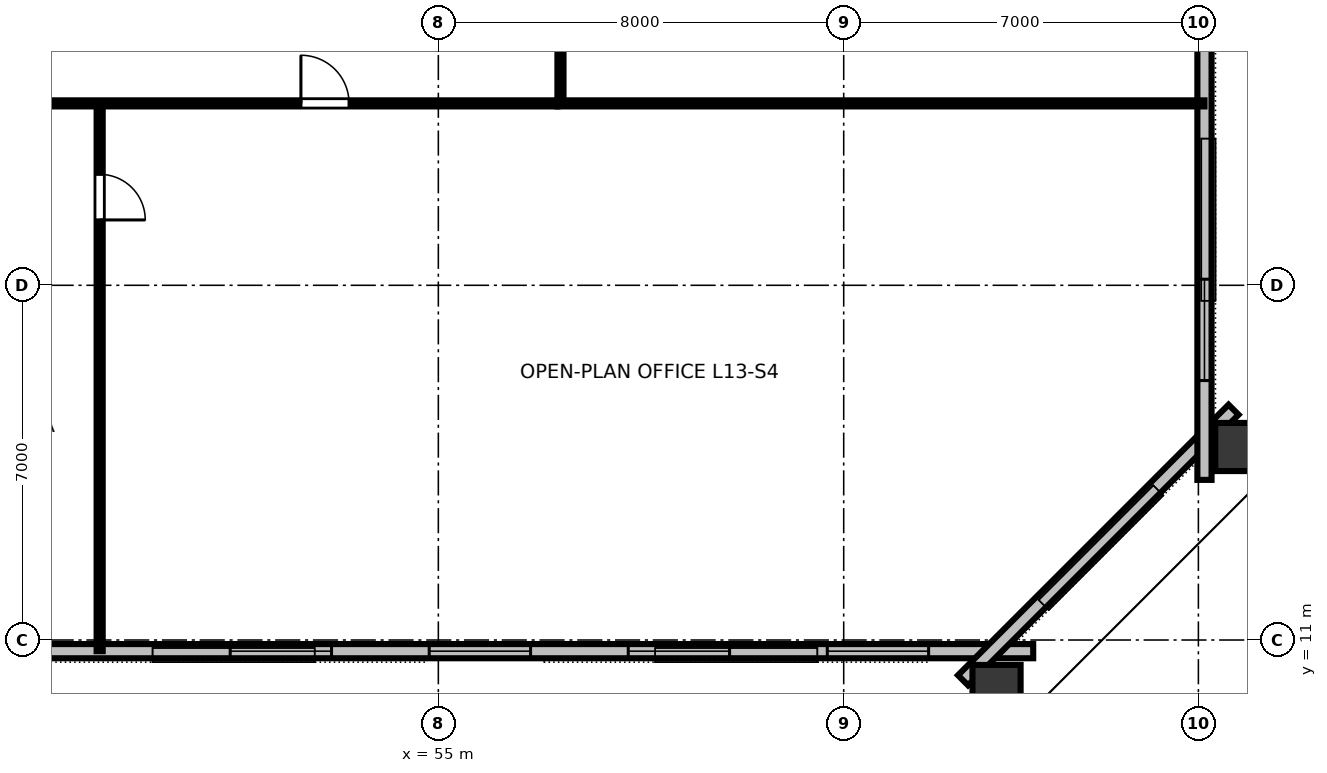
"""IFC4 building model, lengths in metres.
Left out: names, types, materials, properties, quantities, classifications, styles, units other than length and angle.
Written with IfcOpenShell. Run it as: python <this file> out.ifc"""

import sys

from ifc_helpers import new_model, si_unit, direction, frame, frame_2d, origin, origin_2d, place, context, subcontext, project, spatial, rectangle, hollow_rectangle, extrude, element, fill, save


model = new_model("IFC4")
c1 = context("Model", 3, precision=1e-05, world=origin(), true_north=direction((0.0, 1.0)))
c2 = subcontext(c1, "Body", "Model", "MODEL_VIEW")
j1 = project(units=[si_unit("LENGTHUNIT", "METRE"), si_unit("PLANEANGLEUNIT", "RADIAN")], contexts=[c1])
p1 = place(None, origin())
s1 = spatial("IfcSite", under=j1, at=p1, CompositionType="ELEMENT")
p2 = place(p1, origin())
s2 = spatial("IfcBuilding", under=s1, at=p2, CompositionType="ELEMENT")
p3 = place(p2, frame((0.0, 0.0, 53.2)))
s3 = spatial("IfcBuildingStorey", under=s2, at=p3, CompositionType="ELEMENT", Elevation=53.2)
for number, where, z_axis, x_axis in (
    (1, (66.016, 9.933, 0.0), (0.0, 0.0, 1.0), (1.0, 0.0, 0.0)),
    (2, (70.907, 14.809, 0.0), (0.0, 0.0, 1.0), (0.0, 1.0, 0.0)),
):
    element("IfcColumn", number, at=place(p3, frame(where, z_axis=z_axis, x_axis=x_axis)), inside=s3, PredefinedType="COLUMN", context=c2, shape_type="SweptSolid", body=[
        extrude(hollow_rectangle(XDim=0.95, YDim=1.15, WallThickness=0.06, at=origin_2d()), origin(), (0.0, 0.0, 1.0), 3.358),
    ])
p4 = place(p3, frame((25.26, 10.78, 0.0), z_axis=(0.0, 0.0, 1.0), x_axis=(1.0, 0.0, 0.0)))
e3 = element("IfcWall", 3, at=p4, inside=s3, PredefinedType="STANDARD", context=c2, shape_type="SweptSolid", body=[
    extrude(rectangle(XDim=41.48, YDim=0.28, at=frame_2d((20.74, 0.0))), origin(), (0.0, 0.0, 1.0), 3.36),
])
p5 = place(p4, frame((2.064, 0.0, 0.8)))
e4 = element("IfcOpeningElement", 4, at=p5, cuts=e3, PredefinedType="OPENING", context=c2, shape_type="SweptSolid", body=[
    extrude(rectangle(XDim=2.0, YDim=1.95, at=frame_2d((1.0, 0.975))), frame((0.0, 0.15, 0.0), z_axis=(0.0, -1.0, 0.0), x_axis=(1.0, 0.0, 0.0)), (0.0, 0.0, 1.0), 0.3),
])
p6 = place(p4, frame((5.992, 0.0, 0.8)))
e5 = element("IfcOpeningElement", 5, at=p6, cuts=e3, PredefinedType="OPENING", context=c2, shape_type="SweptSolid", body=[
    extrude(rectangle(XDim=2.0, YDim=1.95, at=frame_2d((1.0, 0.975))), frame((0.0, 0.15, 0.0), z_axis=(0.0, -1.0, 0.0), x_axis=(1.0, 0.0, 0.0)), (0.0, 0.0, 1.0), 0.3),
])
p7 = place(p4, frame((9.92, 0.0, 0.8)))
e6 = element("IfcOpeningElement", 6, at=p7, cuts=e3, PredefinedType="OPENING", context=c2, shape_type="SweptSolid", body=[
    extrude(rectangle(XDim=2.0, YDim=1.95, at=frame_2d((1.0, 0.975))), frame((0.0, 0.15, 0.0), z_axis=(0.0, -1.0, 0.0), x_axis=(1.0, 0.0, 0.0)), (0.0, 0.0, 1.0), 0.3),
])
p8 = place(p4, frame((25.632, 0.0, 0.8)))
e7 = element("IfcOpeningElement", 7, at=p8, cuts=e3, PredefinedType="OPENING", context=c2, shape_type="SweptSolid", body=[
    extrude(rectangle(XDim=2.0, YDim=1.95, at=frame_2d((1.0, 0.975))), frame((0.0, 0.15, 0.0), z_axis=(0.0, -1.0, 0.0), x_axis=(1.0, 0.0, 0.0)), (0.0, 0.0, 1.0), 0.3),
])
p9 = place(p4, frame((29.56, 0.0, 0.8)))
e8 = element("IfcOpeningElement", 8, at=p9, cuts=e3, PredefinedType="OPENING", context=c2, shape_type="SweptSolid", body=[
    extrude(rectangle(XDim=2.0, YDim=1.95, at=frame_2d((1.0, 0.975))), frame((0.0, 0.15, 0.0), z_axis=(0.0, -1.0, 0.0), x_axis=(1.0, 0.0, 0.0)), (0.0, 0.0, 1.0), 0.3),
])
p10 = place(p4, frame((33.488, 0.0, 0.8)))
e9 = element("IfcOpeningElement", 9, at=p10, cuts=e3, PredefinedType="OPENING", context=c2, shape_type="SweptSolid", body=[
    extrude(rectangle(XDim=2.0, YDim=1.95, at=frame_2d((1.0, 0.975))), frame((0.0, 0.15, 0.0), z_axis=(0.0, -1.0, 0.0), x_axis=(1.0, 0.0, 0.0)), (0.0, 0.0, 1.0), 0.3),
])
p11 = place(p4, frame((37.416, 0.0, 0.8)))
e10 = element("IfcOpeningElement", 10, at=p11, cuts=e3, PredefinedType="OPENING", context=c2, shape_type="SweptSolid", body=[
    extrude(rectangle(XDim=2.0, YDim=1.95, at=frame_2d((1.0, 0.975))), frame((0.0, 0.15, 0.0), z_axis=(0.0, -1.0, 0.0), x_axis=(1.0, 0.0, 0.0)), (0.0, 0.0, 1.0), 0.3),
])
p12 = place(p3, frame((65.354, 10.206, 0.0), z_axis=(0.0, 0.0, 1.0), x_axis=(0.707106781187, 0.707106781187, 0.0)))
e11 = element("IfcWall", 11, at=p12, inside=s3, PredefinedType="STANDARD", context=c2, shape_type="SweptSolid", body=[
    extrude(rectangle(XDim=7.551, YDim=0.28, at=frame_2d((3.775, 0.0))), origin(), (0.0, 0.0, 1.0), 3.36),
])
p13 = place(p3, frame((70.12, 14.16, 0.0), z_axis=(0.0, 0.0, 1.0), x_axis=(0.0, 1.0, 0.0)))
e12 = element("IfcWall", 12, at=p13, inside=s3, PredefinedType="STANDARD", context=c2, shape_type="SweptSolid", body=[
    extrude(rectangle(XDim=35.68, YDim=0.28, at=frame_2d((17.84, 0.0))), origin(), (0.0, 0.0, 1.0), 3.36),
])
p14 = place(p13, frame((1.96, 0.0, 0.8)))
e13 = element("IfcOpeningElement", 13, at=p14, cuts=e12, PredefinedType="OPENING", context=c2, shape_type="SweptSolid", body=[
    extrude(rectangle(XDim=2.0, YDim=1.95, at=frame_2d((1.0, 0.975))), frame((0.0, 0.15, 0.0), z_axis=(0.0, -1.0, 0.0), x_axis=(1.0, 0.0, 0.0)), (0.0, 0.0, 1.0), 0.3),
])
p15 = place(p13, frame((9.4, 0.0, 0.8)))
e14 = element("IfcOpeningElement", 14, at=p15, cuts=e12, PredefinedType="OPENING", context=c2, shape_type="SweptSolid", body=[
    extrude(rectangle(XDim=2.0, YDim=1.95, at=frame_2d((1.0, 0.975))), frame((0.0, 0.15, 0.0), z_axis=(0.0, -1.0, 0.0), x_axis=(1.0, 0.0, 0.0)), (0.0, 0.0, 1.0), 0.3),
])
p16 = place(p13, frame((13.12, 0.0, 0.8)))
e15 = element("IfcOpeningElement", 15, at=p16, cuts=e12, PredefinedType="OPENING", context=c2, shape_type="SweptSolid", body=[
    extrude(rectangle(XDim=2.0, YDim=1.95, at=frame_2d((1.0, 0.975))), frame((0.0, 0.15, 0.0), z_axis=(0.0, -1.0, 0.0), x_axis=(1.0, 0.0, 0.0)), (0.0, 0.0, 1.0), 0.3),
])
p17 = place(p13, frame((20.56, 0.0, 0.8)))
e16 = element("IfcOpeningElement", 16, at=p17, cuts=e12, PredefinedType="OPENING", context=c2, shape_type="SweptSolid", body=[
    extrude(rectangle(XDim=2.0, YDim=1.95, at=frame_2d((1.0, 0.975))), frame((0.0, 0.15, 0.0), z_axis=(0.0, -1.0, 0.0), x_axis=(1.0, 0.0, 0.0)), (0.0, 0.0, 1.0), 0.3),
])
p18 = place(p13, frame((24.28, 0.0, 0.8)))
e17 = element("IfcOpeningElement", 17, at=p18, cuts=e12, PredefinedType="OPENING", context=c2, shape_type="SweptSolid", body=[
    extrude(rectangle(XDim=2.0, YDim=1.95, at=frame_2d((1.0, 0.975))), frame((0.0, 0.15, 0.0), z_axis=(0.0, -1.0, 0.0), x_axis=(1.0, 0.0, 0.0)), (0.0, 0.0, 1.0), 0.3),
])
p19 = place(p13, frame((31.72, 0.0, 0.8)))
e18 = element("IfcOpeningElement", 18, at=p19, cuts=e12, PredefinedType="OPENING", context=c2, shape_type="SweptSolid", body=[
    extrude(rectangle(XDim=2.0, YDim=1.95, at=frame_2d((1.0, 0.975))), frame((0.0, 0.15, 0.0), z_axis=(0.0, -1.0, 0.0), x_axis=(1.0, 0.0, 0.0)), (0.0, 0.0, 1.0), 0.3),
])
p20 = place(p3, frame((48.316, 21.59, 0.0), z_axis=(0.0, 0.0, 1.0), x_axis=(0.0, -1.0, 0.0)))
e19 = element("IfcWall", 19, at=p20, inside=s3, PredefinedType="PARTITIONING", context=c2, shape_type="SweptSolid", body=[
    extrude(rectangle(XDim=10.81, YDim=0.12, at=frame_2d((5.405, 0.0))), origin(), (0.0, 0.0, 1.0), 2.64),
])
p21 = place(p20, frame((1.4, 0.0, 0.0)))
e20 = element("IfcOpeningElement", 20, at=p21, cuts=e19, PredefinedType="OPENING", context=c2, shape_type="SweptSolid", body=[
    extrude(rectangle(XDim=0.9, YDim=2.15, at=frame_2d((0.45, 1.075))), frame((0.0, 0.07, 0.0), z_axis=(0.0, -1.0, 0.0), x_axis=(1.0, 0.0, 0.0)), (0.0, 0.0, 1.0), 0.14),
])
p22 = place(p3, frame((34.65, 21.59, 0.0), z_axis=(0.0, 0.0, 1.0), x_axis=(1.0, 0.0, 0.0)))
e21 = element("IfcWall", 21, at=p22, inside=s3, PredefinedType="PARTITIONING", context=c2, shape_type="SweptSolid", body=[
    extrude(rectangle(XDim=22.7, YDim=0.12, at=frame_2d((11.35, 0.0))), origin(), (0.0, 0.0, 1.0), 2.64),
])
p23 = place(p22, frame((2.045, 0.0, 0.0)))
e22 = element("IfcOpeningElement", 22, at=p23, cuts=e21, PredefinedType="OPENING", context=c2, shape_type="SweptSolid", body=[
    extrude(rectangle(XDim=0.95, YDim=2.15, at=frame_2d((0.475, 1.075))), frame((0.0, 0.07, 0.0), z_axis=(0.0, -1.0, 0.0), x_axis=(1.0, 0.0, 0.0)), (0.0, 0.0, 1.0), 0.14),
])
p24 = place(p22, frame((7.126, 0.0, 0.0)))
e23 = element("IfcOpeningElement", 23, at=p24, cuts=e21, PredefinedType="OPENING", context=c2, shape_type="SweptSolid", body=[
    extrude(rectangle(XDim=0.95, YDim=2.15, at=frame_2d((0.475, 1.075))), frame((0.0, 0.07, 0.0), z_axis=(0.0, -1.0, 0.0), x_axis=(1.0, 0.0, 0.0)), (0.0, 0.0, 1.0), 0.14),
])
p25 = place(p22, frame((11.509, 0.0, 0.0)))
e24 = element("IfcOpeningElement", 24, at=p25, cuts=e21, PredefinedType="OPENING", context=c2, shape_type="SweptSolid", body=[
    extrude(rectangle(XDim=0.95, YDim=2.15, at=frame_2d((0.475, 1.075))), frame((0.0, 0.07, 0.0), z_axis=(0.0, -1.0, 0.0), x_axis=(1.0, 0.0, 0.0)), (0.0, 0.0, 1.0), 0.14),
])
p26 = place(p22, frame((17.638, 0.0, 0.0)))
e25 = element("IfcOpeningElement", 25, at=p26, cuts=e21, PredefinedType="OPENING", context=c2, shape_type="SweptSolid", body=[
    extrude(rectangle(XDim=0.95, YDim=2.15, at=frame_2d((0.475, 1.075))), frame((0.0, 0.07, 0.0), z_axis=(0.0, -1.0, 0.0), x_axis=(1.0, 0.0, 0.0)), (0.0, 0.0, 1.0), 0.14),
])
p27 = place(p3, frame((57.41, 21.65, 0.0), z_axis=(0.0, 0.0, 1.0), x_axis=(0.0, 1.0, 0.0)))
e26 = element("IfcWall", 26, at=p27, inside=s3, PredefinedType="PARTITIONING", context=c2, shape_type="SweptSolid", body=[
    extrude(rectangle(XDim=20.7, YDim=0.12, at=frame_2d((10.35, 0.0))), origin(), (0.0, 0.0, 1.0), 2.64),
])
p28 = place(p27, frame((5.479, 0.0, 0.0)))
e27 = element("IfcOpeningElement", 27, at=p28, cuts=e26, PredefinedType="OPENING", context=c2, shape_type="SweptSolid", body=[
    extrude(rectangle(XDim=0.95, YDim=2.15, at=frame_2d((0.475, 1.075))), frame((0.0, 0.07, 0.0), z_axis=(0.0, -1.0, 0.0), x_axis=(1.0, 0.0, 0.0)), (0.0, 0.0, 1.0), 0.14),
])
p29 = place(p27, frame((15.629, 0.0, 0.0)))
e28 = element("IfcOpeningElement", 28, at=p29, cuts=e26, PredefinedType="OPENING", context=c2, shape_type="SweptSolid", body=[
    extrude(rectangle(XDim=0.95, YDim=2.15, at=frame_2d((0.475, 1.075))), frame((0.0, 0.07, 0.0), z_axis=(0.0, -1.0, 0.0), x_axis=(1.0, 0.0, 0.0)), (0.0, 0.0, 1.0), 0.14),
])
p30 = place(p3, frame((57.35, 21.59, 0.0), z_axis=(0.0, 0.0, 1.0), x_axis=(1.0, 0.0, 0.0)))
e29 = element("IfcWall", 29, at=p30, inside=s3, PredefinedType="PARTITIONING", context=c2, shape_type="SweptSolid", body=[
    extrude(rectangle(XDim=12.77, YDim=0.12, at=frame_2d((6.385, 0.0))), origin(), (0.0, 0.0, 1.0), 2.64),
])
p31 = place(p8, origin())
e30 = element("IfcWindow", 30, at=p31, inside=s3, PartitioningType="SINGLE_PANEL", PredefinedType="WINDOW", context=c2, shape_type="SweptSolid", body=[
    extrude(rectangle(XDim=2.0, YDim=1.95, at=frame_2d((1.0, 0.975))), frame((0.0, 0.03, 0.0), z_axis=(0.0, -1.0, 0.0), x_axis=(1.0, 0.0, 0.0)), (0.0, 0.0, 1.0), 0.06),
])
fill(e7, e30)
p32 = place(p9, origin())
e31 = element("IfcWindow", 31, at=p32, inside=s3, PartitioningType="SINGLE_PANEL", PredefinedType="WINDOW", context=c2, shape_type="SweptSolid", body=[
    extrude(rectangle(XDim=2.0, YDim=1.95, at=frame_2d((1.0, 0.975))), frame((0.0, 0.03, 0.0), z_axis=(0.0, -1.0, 0.0), x_axis=(1.0, 0.0, 0.0)), (0.0, 0.0, 1.0), 0.06),
])
fill(e8, e31)
p33 = place(p10, origin())
e32 = element("IfcWindow", 32, at=p33, inside=s3, PartitioningType="SINGLE_PANEL", PredefinedType="WINDOW", context=c2, shape_type="SweptSolid", body=[
    extrude(rectangle(XDim=2.0, YDim=1.95, at=frame_2d((1.0, 0.975))), frame((0.0, 0.03, 0.0), z_axis=(0.0, -1.0, 0.0), x_axis=(1.0, 0.0, 0.0)), (0.0, 0.0, 1.0), 0.06),
])
fill(e9, e32)
p34 = place(p11, origin())
e33 = element("IfcWindow", 33, at=p34, inside=s3, PartitioningType="SINGLE_PANEL", PredefinedType="WINDOW", context=c2, shape_type="SweptSolid", body=[
    extrude(rectangle(XDim=2.0, YDim=1.95, at=frame_2d((1.0, 0.975))), frame((0.0, 0.03, 0.0), z_axis=(0.0, -1.0, 0.0), x_axis=(1.0, 0.0, 0.0)), (0.0, 0.0, 1.0), 0.06),
])
fill(e10, e33)
p35 = place(p14, origin())
e34 = element("IfcWindow", 34, at=p35, inside=s3, PartitioningType="SINGLE_PANEL", PredefinedType="WINDOW", context=c2, shape_type="SweptSolid", body=[
    extrude(rectangle(XDim=2.0, YDim=1.95, at=frame_2d((1.0, 0.975))), frame((0.0, 0.03, 0.0), z_axis=(0.0, -1.0, 0.0), x_axis=(1.0, 0.0, 0.0)), (0.0, 0.0, 1.0), 0.06),
])
fill(e13, e34)
p36 = place(p21, origin())
e35 = element("IfcDoor", 35, at=p36, inside=s3, OperationType="SINGLE_SWING_RIGHT", PredefinedType="DOOR", context=c2, shape_type="SweptSolid", body=[
    extrude(rectangle(XDim=0.9, YDim=2.15, at=frame_2d((0.45, 1.075))), frame((0.0, 0.025, 0.0), z_axis=(0.0, -1.0, 0.0), x_axis=(1.0, 0.0, 0.0)), (0.0, 0.0, 1.0), 0.05),
])
fill(e20, e35)
p37 = place(p26, origin())
e36 = element("IfcDoor", 36, at=p37, inside=s3, OperationType="SINGLE_SWING_LEFT", PredefinedType="DOOR", context=c2, shape_type="SweptSolid", body=[
    extrude(rectangle(XDim=0.95, YDim=2.15, at=frame_2d((0.475, 1.075))), frame((0.0, 0.025, 0.0), z_axis=(0.0, -1.0, 0.0), x_axis=(1.0, 0.0, 0.0)), (0.0, 0.0, 1.0), 0.05),
])
fill(e25, e36)
save(model, sys.argv[1])
